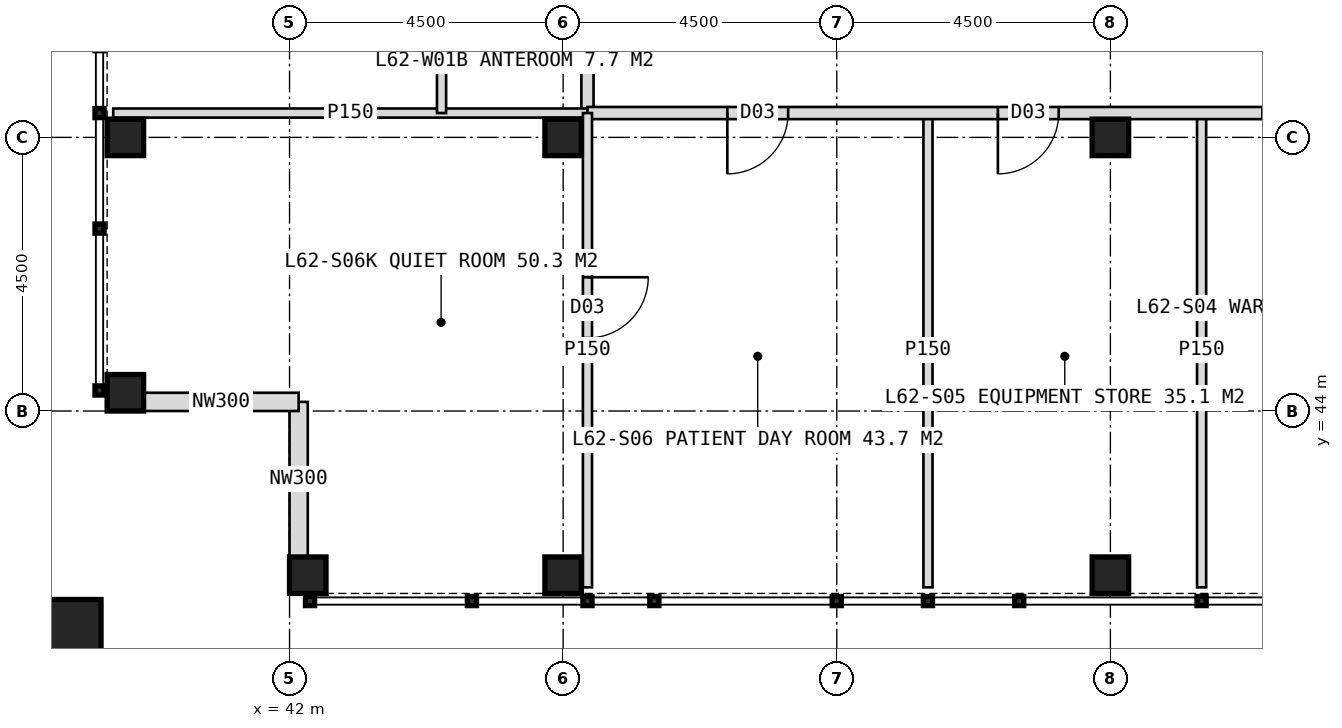
"""IFC4 building model, lengths in metres.
Left out: names, types, materials, properties, quantities, classifications, styles, units other than length and angle.
Written with IfcOpenShell. Run it as: python <this file> out.ifc"""

import sys

from ifc_helpers import new_model, si_unit, direction, frame, frame_2d, origin, origin_2d, place, context, subcontext, project, spatial, rectangle, hollow_rectangle, extrude, element, fill, save


model = new_model("IFC4")
c1 = context("Model", 3, precision=1e-05, world=origin(), true_north=direction((0.0, 1.0)))
c2 = subcontext(c1, "Body", "Model", "MODEL_VIEW")
j1 = project(units=[si_unit("LENGTHUNIT", "METRE"), si_unit("PLANEANGLEUNIT", "RADIAN")], contexts=[c1])
p1 = place(None, origin())
s1 = spatial("IfcSite", under=j1, at=p1, CompositionType="ELEMENT")
p2 = place(p1, origin())
s2 = spatial("IfcBuilding", under=s1, at=p2, CompositionType="ELEMENT")
p3 = place(p2, frame((0.0, 0.0, 258.0)))
s3 = spatial("IfcBuildingStorey", under=s2, at=p3, CompositionType="ELEMENT", Elevation=258.0)
for number, where, z_axis, x_axis in (
    (1, (46.5, 48.5, 0.0), (0.0, 0.0, 1.0), (1.0, 0.0, 0.0)),
    (2, (55.5, 48.5, 0.0), (0.0, 0.0, 1.0), (1.0, 0.0, 0.0)),
    (3, (42.3, 41.3, 0.0), (0.0, 0.0, 1.0), (1.0, 0.0, 0.0)),
    (4, (39.3, 44.3, 0.0), (0.0, 0.0, 1.0), (1.0, 0.0, 0.0)),
    (5, (46.5, 41.3, 0.0), (0.0, 0.0, 1.0), (1.0, 0.0, 0.0)),
    (6, (39.3, 48.5, 0.0), (0.0, 0.0, 1.0), (1.0, 0.0, 0.0)),
    (7, (55.5, 41.3, 0.0), (0.0, 0.0, 1.0), (1.0, 0.0, 0.0)),
):
    element("IfcColumn", number, at=place(p3, frame(where, z_axis=z_axis, x_axis=x_axis)), inside=s3, PredefinedType="COLUMN", context=c2, shape_type="SweptSolid", body=[
        extrude(hollow_rectangle(XDim=0.6, YDim=0.6, WallThickness=0.04, at=origin_2d()), origin(), (0.0, 0.0, 1.0), 4.0),
    ])
p4 = place(p3, frame((38.4, 40.4, 0.0), z_axis=(0.0, 0.0, 1.0), x_axis=(1.0, 0.0, 0.0)))
e8 = element("IfcColumn", 8, at=p4, inside=s3, PredefinedType="COLUMN", context=c2, shape_type="SweptSolid", body=[
    extrude(hollow_rectangle(XDim=1.0, YDim=1.0, WallThickness=0.06, at=origin_2d()), origin(), (0.0, 0.0, 1.0), 4.0),
])
for number, where, z_axis, x_axis in (
    (9, (42.15, 41.6, 0.0), (0.0, 0.0, 1.0), (0.0, 1.0, 0.0)),
    (10, (42.15, 44.15, 0.0), (0.0, 0.0, 1.0), (-1.0, 0.0, 0.0)),
):
    element("IfcWall", number, at=place(p3, frame(where, z_axis=z_axis, x_axis=x_axis)), inside=s3, PredefinedType="ELEMENTEDWALL", context=c2, shape_type="SweptSolid", body=[
        extrude(rectangle(XDim=2.55, YDim=0.3, at=frame_2d((1.275, 0.0))), origin(), (0.0, 0.0, 1.0), 2.95),
    ])
p5 = place(p3, frame((46.9, 48.9, 0.0), z_axis=(0.0, 0.0, 1.0), x_axis=(0.0, 1.0, 0.0)))
e11 = element("IfcWall", 11, at=p5, inside=s3, PredefinedType="PARTITIONING", context=c2, shape_type="SweptSolid", body=[
    extrude(rectangle(XDim=26.2, YDim=0.2, at=frame_2d((13.1, 0.0))), origin(), (0.0, 0.0, 1.0), 3.75),
])
p6 = place(p5, frame((1.75, 0.0, 0.0)))
e12 = element("IfcOpeningElement", 12, at=p6, cuts=e11, PredefinedType="OPENING", context=c2, shape_type="SweptSolid", body=[
    extrude(rectangle(XDim=1.2, YDim=2.2, at=frame_2d((0.6, 1.1))), frame((0.0, 0.11, 0.0), z_axis=(0.0, -1.0, 0.0), x_axis=(1.0, 0.0, 0.0)), (0.0, 0.0, 1.0), 0.22),
])
p7 = place(p5, frame((6.75, 0.0, 0.0)))
e13 = element("IfcOpeningElement", 13, at=p7, cuts=e11, PredefinedType="OPENING", context=c2, shape_type="SweptSolid", body=[
    extrude(rectangle(XDim=1.0, YDim=2.1, at=frame_2d((0.5, 1.05))), frame((0.0, 0.11, 0.0), z_axis=(0.0, -1.0, 0.0), x_axis=(1.0, 0.0, 0.0)), (0.0, 0.0, 1.0), 0.22),
])
p8 = place(p5, frame((11.1, 0.0, 0.0)))
e14 = element("IfcOpeningElement", 14, at=p8, cuts=e11, PredefinedType="OPENING", context=c2, shape_type="SweptSolid", body=[
    extrude(rectangle(XDim=1.0, YDim=2.1, at=frame_2d((0.5, 1.05))), frame((0.0, 0.11, 0.0), z_axis=(0.0, -1.0, 0.0), x_axis=(1.0, 0.0, 0.0)), (0.0, 0.0, 1.0), 0.22),
])
p9 = place(p5, frame((18.45, 0.0, 0.0)))
e15 = element("IfcOpeningElement", 15, at=p9, cuts=e11, PredefinedType="OPENING", context=c2, shape_type="SweptSolid", body=[
    extrude(rectangle(XDim=1.2, YDim=2.2, at=frame_2d((0.6, 1.1))), frame((0.0, 0.11, 0.0), z_axis=(0.0, -1.0, 0.0), x_axis=(1.0, 0.0, 0.0)), (0.0, 0.0, 1.0), 0.22),
])
p10 = place(p5, frame((23.25, 0.0, 0.0)))
e16 = element("IfcOpeningElement", 16, at=p10, cuts=e11, PredefinedType="OPENING", context=c2, shape_type="SweptSolid", body=[
    extrude(rectangle(XDim=1.2, YDim=2.2, at=frame_2d((0.6, 1.1))), frame((0.0, 0.11, 0.0), z_axis=(0.0, -1.0, 0.0), x_axis=(1.0, 0.0, 0.0)), (0.0, 0.0, 1.0), 0.22),
])
p11 = place(p3, frame((46.9, 48.9, 0.0), z_axis=(0.0, 0.0, 1.0), x_axis=(-1.0, 0.0, 0.0)))
e17 = element("IfcWall", 17, at=p11, inside=s3, PredefinedType="PARTITIONING", context=c2, shape_type="SweptSolid", body=[
    extrude(rectangle(XDim=7.8, YDim=0.15, at=frame_2d((3.9, 0.0))), origin(), (0.0, 0.0, 1.0), 3.75),
])
p12 = place(p3, frame((44.5, 48.9, 0.0), z_axis=(0.0, 0.0, 1.0), x_axis=(0.0, 1.0, 0.0)))
e18 = element("IfcWall", 18, at=p12, inside=s3, PredefinedType="PARTITIONING", context=c2, shape_type="SweptSolid", body=[
    extrude(rectangle(XDim=3.2, YDim=0.15, at=frame_2d((1.6, 0.0))), origin(), (0.0, 0.0, 1.0), 3.75),
])
p13 = place(p12, frame((1.75, 0.0, 0.0)))
e19 = element("IfcOpeningElement", 19, at=p13, cuts=e18, PredefinedType="OPENING", context=c2, shape_type="SweptSolid", body=[
    extrude(rectangle(XDim=1.2, YDim=2.2, at=frame_2d((0.6, 1.1))), frame((0.0, 0.085, 0.0), z_axis=(0.0, -1.0, 0.0), x_axis=(1.0, 0.0, 0.0)), (0.0, 0.0, 1.0), 0.17),
])
for number, where, z_axis, x_axis in (
    (20, (57.0, 48.9, 0.0), (0.0, 0.0, 1.0), (0.0, -1.0, 0.0)),
    (21, (52.5, 48.9, 0.0), (0.0, 0.0, 1.0), (0.0, -1.0, 0.0)),
):
    element("IfcWall", number, at=place(p3, frame(where, z_axis=z_axis, x_axis=x_axis)), inside=s3, PredefinedType="PARTITIONING", context=c2, shape_type="SweptSolid", body=[
        extrude(rectangle(XDim=7.8, YDim=0.15, at=frame_2d((3.9, 0.0))), origin(), (0.0, 0.0, 1.0), 3.75),
    ])
p14 = place(p3, frame((73.1, 48.9, 0.0), z_axis=(0.0, 0.0, 1.0), x_axis=(-1.0, 0.0, 0.0)))
e22 = element("IfcWall", 22, at=p14, inside=s3, PredefinedType="PARTITIONING", context=c2, shape_type="SweptSolid", body=[
    extrude(rectangle(XDim=26.2, YDim=0.2, at=frame_2d((13.1, 0.0))), origin(), (0.0, 0.0, 1.0), 3.75),
])
p15 = place(p14, frame((1.75, 0.0, 0.0)))
e23 = element("IfcOpeningElement", 23, at=p15, cuts=e22, PredefinedType="OPENING", context=c2, shape_type="SweptSolid", body=[
    extrude(rectangle(XDim=1.2, YDim=2.2, at=frame_2d((0.6, 1.1))), frame((0.0, 0.11, 0.0), z_axis=(0.0, -1.0, 0.0), x_axis=(1.0, 0.0, 0.0)), (0.0, 0.0, 1.0), 0.22),
])
p16 = place(p14, frame((6.75, 0.0, 0.0)))
e24 = element("IfcOpeningElement", 24, at=p16, cuts=e22, PredefinedType="OPENING", context=c2, shape_type="SweptSolid", body=[
    extrude(rectangle(XDim=1.0, YDim=2.1, at=frame_2d((0.5, 1.05))), frame((0.0, 0.11, 0.0), z_axis=(0.0, -1.0, 0.0), x_axis=(1.0, 0.0, 0.0)), (0.0, 0.0, 1.0), 0.22),
])
p17 = place(p14, frame((11.1, 0.0, 0.0)))
e25 = element("IfcOpeningElement", 25, at=p17, cuts=e22, PredefinedType="OPENING", context=c2, shape_type="SweptSolid", body=[
    extrude(rectangle(XDim=1.0, YDim=2.1, at=frame_2d((0.5, 1.05))), frame((0.0, 0.11, 0.0), z_axis=(0.0, -1.0, 0.0), x_axis=(1.0, 0.0, 0.0)), (0.0, 0.0, 1.0), 0.22),
])
p18 = place(p14, frame((14.1, 0.0, 0.0)))
e26 = element("IfcOpeningElement", 26, at=p18, cuts=e22, PredefinedType="OPENING", context=c2, shape_type="SweptSolid", body=[
    extrude(rectangle(XDim=1.0, YDim=2.1, at=frame_2d((0.5, 1.05))), frame((0.0, 0.11, 0.0), z_axis=(0.0, -1.0, 0.0), x_axis=(1.0, 0.0, 0.0)), (0.0, 0.0, 1.0), 0.22),
])
p19 = place(p14, frame((18.45, 0.0, 0.0)))
e27 = element("IfcOpeningElement", 27, at=p19, cuts=e22, PredefinedType="OPENING", context=c2, shape_type="SweptSolid", body=[
    extrude(rectangle(XDim=1.0, YDim=2.1, at=frame_2d((0.5, 1.05))), frame((0.0, 0.11, 0.0), z_axis=(0.0, -1.0, 0.0), x_axis=(1.0, 0.0, 0.0)), (0.0, 0.0, 1.0), 0.22),
])
p20 = place(p14, frame((22.9, 0.0, 0.0)))
e28 = element("IfcOpeningElement", 28, at=p20, cuts=e22, PredefinedType="OPENING", context=c2, shape_type="SweptSolid", body=[
    extrude(rectangle(XDim=1.0, YDim=2.1, at=frame_2d((0.5, 1.05))), frame((0.0, 0.11, 0.0), z_axis=(0.0, -1.0, 0.0), x_axis=(1.0, 0.0, 0.0)), (0.0, 0.0, 1.0), 0.22),
])
p21 = place(p3, frame((46.9, 48.9, 0.0), z_axis=(0.0, 0.0, 1.0), x_axis=(0.0, -1.0, 0.0)))
e29 = element("IfcWall", 29, at=p21, inside=s3, PredefinedType="PARTITIONING", context=c2, shape_type="SweptSolid", body=[
    extrude(rectangle(XDim=7.8, YDim=0.15, at=frame_2d((3.9, 0.0))), origin(), (0.0, 0.0, 1.0), 3.75),
])
p22 = place(p21, frame((2.7, 0.0, 0.0)))
e30 = element("IfcOpeningElement", 30, at=p22, cuts=e29, PredefinedType="OPENING", context=c2, shape_type="SweptSolid", body=[
    extrude(rectangle(XDim=1.0, YDim=2.1, at=frame_2d((0.5, 1.05))), frame((0.0, 0.085, 0.0), z_axis=(0.0, -1.0, 0.0), x_axis=(1.0, 0.0, 0.0)), (0.0, 0.0, 1.0), 0.17),
])
p23 = place(p19, origin())
e31 = element("IfcDoor", 31, at=p23, inside=s3, OperationType="SINGLE_SWING_RIGHT", PredefinedType="DOOR", context=c2, shape_type="SweptSolid", body=[
    extrude(rectangle(XDim=1.0, YDim=2.1, at=frame_2d((0.5, 1.05))), frame((0.0, 0.025, 0.0), z_axis=(0.0, -1.0, 0.0), x_axis=(1.0, 0.0, 0.0)), (0.0, 0.0, 1.0), 0.05),
])
fill(e27, e31)
p24 = place(p22, origin())
e32 = element("IfcDoor", 32, at=p24, inside=s3, OperationType="SINGLE_SWING_LEFT", PredefinedType="DOOR", context=c2, shape_type="SweptSolid", body=[
    extrude(rectangle(XDim=1.0, YDim=2.1, at=frame_2d((0.5, 1.05))), frame((0.0, 0.025, 0.0), z_axis=(0.0, -1.0, 0.0), x_axis=(1.0, 0.0, 0.0)), (0.0, 0.0, 1.0), 0.05),
])
fill(e30, e32)
p25 = place(p20, origin())
e33 = element("IfcDoor", 33, at=p25, inside=s3, OperationType="SINGLE_SWING_RIGHT", PredefinedType="DOOR", context=c2, shape_type="SweptSolid", body=[
    extrude(rectangle(XDim=1.0, YDim=2.1, at=frame_2d((0.5, 1.05))), frame((0.0, 0.025, 0.0), z_axis=(0.0, -1.0, 0.0), x_axis=(1.0, 0.0, 0.0)), (0.0, 0.0, 1.0), 0.05),
])
fill(e28, e33)
save(model, sys.argv[1])
